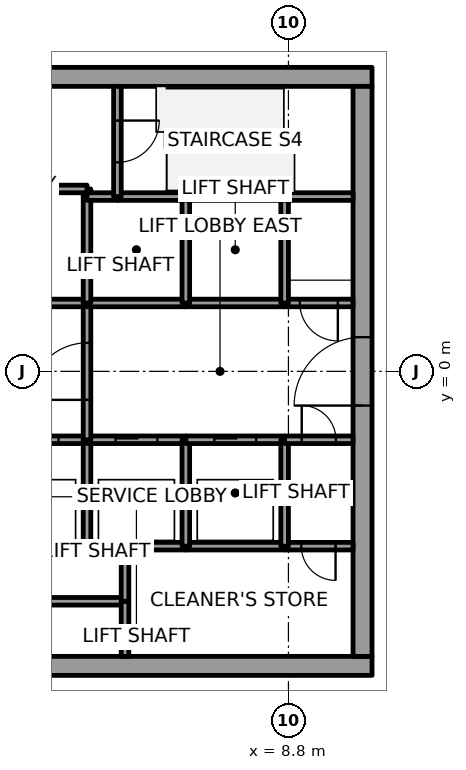
"""IFC4 building model, lengths in metres.
Left out: names, types, materials, properties, quantities, classifications, styles, units other than length and angle.
Written with IfcOpenShell. Run it as: python <this file> out.ifc"""

import sys

from ifc_helpers import new_model, si_unit, direction, frame, frame_2d, origin, place, context, subcontext, project, spatial, rectangle, extrude, element, fill, save


model = new_model("IFC4")
c1 = context("Model", 3, precision=1e-05, world=origin(), true_north=direction((0.0, 1.0)))
c2 = subcontext(c1, "Body", "Model", "MODEL_VIEW")
j1 = project(units=[si_unit("LENGTHUNIT", "METRE"), si_unit("PLANEANGLEUNIT", "RADIAN")], contexts=[c1])
p1 = place(None, origin())
s1 = spatial("IfcSite", under=j1, at=p1, CompositionType="ELEMENT")
p2 = place(p1, origin())
s2 = spatial("IfcBuilding", under=s1, at=p2, CompositionType="ELEMENT")
p3 = place(p2, frame((0.0, 0.0, 137.8)))
s3 = spatial("IfcBuildingStorey", under=s2, at=p3, CompositionType="ELEMENT", Elevation=137.8)
p4 = place(p3, frame((-11.0, -7.75, 0.0), z_axis=(0.0, 0.0, 1.0), x_axis=(1.0, 0.0, 0.0)))
e1 = element("IfcWall", 1, at=p4, inside=s3, PredefinedType="SHEAR", context=c2, shape_type="SweptSolid", body=[
    extrude(rectangle(XDim=22.0, YDim=0.5, at=frame_2d((11.0, 0.0))), origin(), (0.0, 0.0, 1.0), 4.0),
])
p5 = place(p4, frame((10.45, 0.0, 0.0)))
e2 = element("IfcOpeningElement", 2, at=p5, cuts=e1, PredefinedType="OPENING", context=c2, shape_type="SweptSolid", body=[
    extrude(rectangle(XDim=1.1, YDim=2.1, at=frame_2d((0.55, 1.05))), frame((0.0, 0.25, 0.0), z_axis=(0.0, -1.0, 0.0), x_axis=(1.0, 0.0, 0.0)), (0.0, 0.0, 1.0), 0.5),
])
p6 = place(p3, frame((-11.0, 7.75, 0.0), z_axis=(0.0, 0.0, 1.0), x_axis=(1.0, 0.0, 0.0)))
e3 = element("IfcWall", 3, at=p6, inside=s3, PredefinedType="SHEAR", context=c2, shape_type="SweptSolid", body=[
    extrude(rectangle(XDim=22.0, YDim=0.5, at=frame_2d((11.0, 0.0))), origin(), (0.0, 0.0, 1.0), 4.0),
])
p7 = place(p6, frame((10.45, 0.0, 0.0)))
e4 = element("IfcOpeningElement", 4, at=p7, cuts=e3, PredefinedType="OPENING", context=c2, shape_type="SweptSolid", body=[
    extrude(rectangle(XDim=1.1, YDim=2.1, at=frame_2d((0.55, 1.05))), frame((0.0, 0.25, 0.0), z_axis=(0.0, -1.0, 0.0), x_axis=(1.0, 0.0, 0.0)), (0.0, 0.0, 1.0), 0.5),
])
p8 = place(p3, frame((10.75, -7.5, 0.0), z_axis=(0.0, 0.0, 1.0), x_axis=(0.0, 1.0, 0.0)))
e5 = element("IfcWall", 5, at=p8, inside=s3, PredefinedType="SHEAR", context=c2, shape_type="SweptSolid", body=[
    extrude(rectangle(XDim=15.0, YDim=0.5, at=frame_2d((7.5, 0.0))), origin(), (0.0, 0.0, 1.0), 4.0),
])
p9 = place(p8, frame((6.6, 0.0, 0.0)))
e6 = element("IfcOpeningElement", 6, at=p9, cuts=e5, PredefinedType="OPENING", context=c2, shape_type="SweptSolid", body=[
    extrude(rectangle(XDim=1.8, YDim=2.1, at=frame_2d((0.9, 1.05))), frame((0.0, 0.25, 0.0), z_axis=(0.0, -1.0, 0.0), x_axis=(1.0, 0.0, 0.0)), (0.0, 0.0, 1.0), 0.5),
])
p10 = place(p3, frame((4.5, -6.05, 0.0), z_axis=(0.0, 0.0, 1.0), x_axis=(-1.0, 0.0, 0.0)))
e7 = element("IfcWall", 7, at=p10, inside=s3, PredefinedType="SOLIDWALL", context=c2, shape_type="SweptSolid", body=[
    extrude(rectangle(XDim=3.6, YDim=0.2, at=frame_2d((1.8, 0.0))), origin(), (0.0, 0.0, 1.0), 3.85),
])
p11 = place(p3, frame((3.5, -4.6, 0.0), z_axis=(0.0, 0.0, 1.0), x_axis=(-1.0, 0.0, 0.0)))
e8 = element("IfcWall", 8, at=p11, inside=s3, PredefinedType="SOLIDWALL", context=c2, shape_type="SweptSolid", body=[
    extrude(rectangle(XDim=2.6, YDim=0.2, at=frame_2d((1.3, 0.0))), origin(), (0.0, 0.0, 1.0), 3.85),
])
p12 = place(p3, frame((0.9, -1.8, 0.0), z_axis=(0.0, 0.0, 1.0), x_axis=(1.0, 0.0, 0.0)))
e9 = element("IfcWall", 9, at=p12, inside=s3, PredefinedType="SOLIDWALL", context=c2, shape_type="SweptSolid", body=[
    extrude(rectangle(XDim=2.6, YDim=0.2, at=frame_2d((1.3, 0.0))), origin(), (0.0, 0.0, 1.0), 3.85),
])
p13 = place(p12, frame((0.75, 0.0, 0.0)))
e10 = element("IfcOpeningElement", 10, at=p13, cuts=e9, PredefinedType="OPENING", context=c2, shape_type="SweptSolid", body=[
    extrude(rectangle(XDim=1.1, YDim=2.1, at=frame_2d((0.55, 1.05))), frame((0.0, 0.1, 0.0), z_axis=(0.0, -1.0, 0.0), x_axis=(1.0, 0.0, 0.0)), (0.0, 0.0, 1.0), 0.2),
])
p14 = place(p3, frame((3.5, 1.8, 0.0), z_axis=(0.0, 0.0, 1.0), x_axis=(-1.0, 0.0, 0.0)))
e11 = element("IfcWall", 11, at=p14, inside=s3, PredefinedType="SOLIDWALL", context=c2, shape_type="SweptSolid", body=[
    extrude(rectangle(XDim=2.6, YDim=0.2, at=frame_2d((1.3, 0.0))), origin(), (0.0, 0.0, 1.0), 3.85),
])
p15 = place(p3, frame((3.5, 4.6, 0.0), z_axis=(0.0, 0.0, 1.0), x_axis=(0.0, 1.0, 0.0)))
e12 = element("IfcWall", 12, at=p15, inside=s3, PredefinedType="SOLIDWALL", context=c2, shape_type="SweptSolid", body=[
    extrude(rectangle(XDim=0.2, YDim=0.2, at=frame_2d((0.1, 0.0))), origin(), (0.0, 0.0, 1.0), 3.85),
])
p16 = place(p3, frame((3.5, 4.8, 0.0), z_axis=(0.0, 0.0, 1.0), x_axis=(-1.0, 0.0, 0.0)))
e13 = element("IfcWall", 13, at=p16, inside=s3, PredefinedType="SOLIDWALL", context=c2, shape_type="SweptSolid", body=[
    extrude(rectangle(XDim=2.6, YDim=0.2, at=frame_2d((1.3, 0.0))), origin(), (0.0, 0.0, 1.0), 3.85),
])
p17 = place(p3, frame((4.5, -4.6, 0.0), z_axis=(0.0, 0.0, 1.0), x_axis=(-1.0, 0.0, 0.0)))
e14 = element("IfcWall", 14, at=p17, inside=s3, PredefinedType="SOLIDWALL", context=c2, shape_type="SweptSolid", body=[
    extrude(rectangle(XDim=1.0, YDim=0.2, at=frame_2d((0.5, 0.0))), origin(), (0.0, 0.0, 1.0), 3.85),
])
p18 = place(p3, frame((3.5, -4.6, 0.0), z_axis=(0.0, 0.0, 1.0), x_axis=(0.0, 1.0, 0.0)))
e15 = element("IfcWall", 15, at=p18, inside=s3, PredefinedType="SOLIDWALL", context=c2, shape_type="SweptSolid", body=[
    extrude(rectangle(XDim=2.8, YDim=0.2, at=frame_2d((1.4, 0.0))), origin(), (0.0, 0.0, 1.0), 3.85),
])
p19 = place(p3, frame((3.5, -1.8, 0.0), z_axis=(0.0, 0.0, 1.0), x_axis=(1.0, 0.0, 0.0)))
e16 = element("IfcWall", 16, at=p19, inside=s3, PredefinedType="SOLIDWALL", context=c2, shape_type="SweptSolid", body=[
    extrude(rectangle(XDim=2.6, YDim=0.2, at=frame_2d((1.3, 0.0))), origin(), (0.0, 0.0, 1.0), 3.85),
])
p20 = place(p19, frame((0.75, 0.0, 0.0)))
e17 = element("IfcOpeningElement", 17, at=p20, cuts=e16, PredefinedType="OPENING", context=c2, shape_type="SweptSolid", body=[
    extrude(rectangle(XDim=1.1, YDim=2.1, at=frame_2d((0.55, 1.05))), frame((0.0, 0.1, 0.0), z_axis=(0.0, -1.0, 0.0), x_axis=(1.0, 0.0, 0.0)), (0.0, 0.0, 1.0), 0.2),
])
p21 = place(p3, frame((3.5, -1.8, 0.0), z_axis=(0.0, 0.0, 1.0), x_axis=(0.0, 1.0, 0.0)))
e18 = element("IfcWall", 18, at=p21, inside=s3, PredefinedType="SOLIDWALL", context=c2, shape_type="SweptSolid", body=[
    extrude(rectangle(XDim=3.6, YDim=0.2, at=frame_2d((1.8, 0.0))), origin(), (0.0, 0.0, 1.0), 3.85),
])
p22 = place(p21, frame((1.05, 0.0, 0.0)))
e19 = element("IfcOpeningElement", 19, at=p22, cuts=e18, PredefinedType="OPENING", context=c2, shape_type="SweptSolid", body=[
    extrude(rectangle(XDim=1.5, YDim=2.1, at=frame_2d((0.75, 1.05))), frame((0.0, 0.1, 0.0), z_axis=(0.0, -1.0, 0.0), x_axis=(1.0, 0.0, 0.0)), (0.0, 0.0, 1.0), 0.2),
])
p23 = place(p3, frame((6.1, 1.8, 0.0), z_axis=(0.0, 0.0, 1.0), x_axis=(-1.0, 0.0, 0.0)))
e20 = element("IfcWall", 20, at=p23, inside=s3, PredefinedType="SOLIDWALL", context=c2, shape_type="SweptSolid", body=[
    extrude(rectangle(XDim=2.6, YDim=0.2, at=frame_2d((1.3, 0.0))), origin(), (0.0, 0.0, 1.0), 3.85),
])
p24 = place(p3, frame((3.5, 1.8, 0.0), z_axis=(0.0, 0.0, 1.0), x_axis=(0.0, 1.0, 0.0)))
e21 = element("IfcWall", 21, at=p24, inside=s3, PredefinedType="SOLIDWALL", context=c2, shape_type="SweptSolid", body=[
    extrude(rectangle(XDim=2.8, YDim=0.2, at=frame_2d((1.4, 0.0))), origin(), (0.0, 0.0, 1.0), 3.85),
])
p25 = place(p3, frame((4.3, 4.6, 0.0), z_axis=(0.0, 0.0, 1.0), x_axis=(-1.0, 0.0, 0.0)))
e22 = element("IfcWall", 22, at=p25, inside=s3, PredefinedType="SOLIDWALL", context=c2, shape_type="SweptSolid", body=[
    extrude(rectangle(XDim=0.8, YDim=0.2, at=frame_2d((0.4, 0.0))), origin(), (0.0, 0.0, 1.0), 3.85),
])
p26 = place(p3, frame((6.1, 4.6, 0.0), z_axis=(0.0, 0.0, 1.0), x_axis=(-1.0, 0.0, 0.0)))
e23 = element("IfcWall", 23, at=p26, inside=s3, PredefinedType="SOLIDWALL", context=c2, shape_type="SweptSolid", body=[
    extrude(rectangle(XDim=1.8, YDim=0.2, at=frame_2d((0.9, 0.0))), origin(), (0.0, 0.0, 1.0), 3.85),
])
p27 = place(p3, frame((4.3, 7.5, 0.0), z_axis=(0.0, 0.0, 1.0), x_axis=(0.0, -1.0, 0.0)))
e24 = element("IfcWall", 24, at=p27, inside=s3, PredefinedType="SOLIDWALL", context=c2, shape_type="SweptSolid", body=[
    extrude(rectangle(XDim=2.9, YDim=0.2, at=frame_2d((1.45, 0.0))), origin(), (0.0, 0.0, 1.0), 3.85),
])
p28 = place(p27, frame((0.9, 0.0, 0.0)))
e25 = element("IfcOpeningElement", 25, at=p28, cuts=e24, PredefinedType="OPENING", context=c2, shape_type="SweptSolid", body=[
    extrude(rectangle(XDim=1.1, YDim=2.1, at=frame_2d((0.55, 1.05))), frame((0.0, 0.1, 0.0), z_axis=(0.0, -1.0, 0.0), x_axis=(1.0, 0.0, 0.0)), (0.0, 0.0, 1.0), 0.2),
])
for number, where, z_axis, x_axis in (
    (26, (4.5, -6.05, 0.0), (0.0, 0.0, 1.0), (0.0, -1.0, 0.0)),
    (27, (4.5, -4.6, 0.0), (0.0, 0.0, 1.0), (0.0, -1.0, 0.0)),
):
    element("IfcWall", number, at=place(p3, frame(where, z_axis=z_axis, x_axis=x_axis)), inside=s3, PredefinedType="SOLIDWALL", context=c2, shape_type="SweptSolid", body=[
        extrude(rectangle(XDim=1.45, YDim=0.2, at=frame_2d((0.725, 0.0))), origin(), (0.0, 0.0, 1.0), 3.85),
    ])
p29 = place(p3, frame((6.1, -4.6, 0.0), z_axis=(0.0, 0.0, 1.0), x_axis=(-1.0, 0.0, 0.0)))
e28 = element("IfcWall", 28, at=p29, inside=s3, PredefinedType="SOLIDWALL", context=c2, shape_type="SweptSolid", body=[
    extrude(rectangle(XDim=1.6, YDim=0.2, at=frame_2d((0.8, 0.0))), origin(), (0.0, 0.0, 1.0), 3.85),
])
p30 = place(p3, frame((8.7, -4.6, 0.0), z_axis=(0.0, 0.0, 1.0), x_axis=(-1.0, 0.0, 0.0)))
e29 = element("IfcWall", 29, at=p30, inside=s3, PredefinedType="SOLIDWALL", context=c2, shape_type="SweptSolid", body=[
    extrude(rectangle(XDim=2.6, YDim=0.2, at=frame_2d((1.3, 0.0))), origin(), (0.0, 0.0, 1.0), 3.85),
])
p31 = place(p3, frame((6.1, -4.6, 0.0), z_axis=(0.0, 0.0, 1.0), x_axis=(0.0, 1.0, 0.0)))
e30 = element("IfcWall", 30, at=p31, inside=s3, PredefinedType="SOLIDWALL", context=c2, shape_type="SweptSolid", body=[
    extrude(rectangle(XDim=2.8, YDim=0.2, at=frame_2d((1.4, 0.0))), origin(), (0.0, 0.0, 1.0), 3.85),
])
p32 = place(p3, frame((6.1, -1.8, 0.0), z_axis=(0.0, 0.0, 1.0), x_axis=(1.0, 0.0, 0.0)))
e31 = element("IfcWall", 31, at=p32, inside=s3, PredefinedType="SOLIDWALL", context=c2, shape_type="SweptSolid", body=[
    extrude(rectangle(XDim=2.6, YDim=0.2, at=frame_2d((1.3, 0.0))), origin(), (0.0, 0.0, 1.0), 3.85),
])
p33 = place(p32, frame((0.75, 0.0, 0.0)))
e32 = element("IfcOpeningElement", 32, at=p33, cuts=e31, PredefinedType="OPENING", context=c2, shape_type="SweptSolid", body=[
    extrude(rectangle(XDim=1.1, YDim=2.1, at=frame_2d((0.55, 1.05))), frame((0.0, 0.1, 0.0), z_axis=(0.0, -1.0, 0.0), x_axis=(1.0, 0.0, 0.0)), (0.0, 0.0, 1.0), 0.2),
])
p34 = place(p3, frame((8.7, 1.8, 0.0), z_axis=(0.0, 0.0, 1.0), x_axis=(-1.0, 0.0, 0.0)))
e33 = element("IfcWall", 33, at=p34, inside=s3, PredefinedType="SOLIDWALL", context=c2, shape_type="SweptSolid", body=[
    extrude(rectangle(XDim=2.6, YDim=0.2, at=frame_2d((1.3, 0.0))), origin(), (0.0, 0.0, 1.0), 3.85),
])
p35 = place(p3, frame((6.1, 1.8, 0.0), z_axis=(0.0, 0.0, 1.0), x_axis=(0.0, 1.0, 0.0)))
e34 = element("IfcWall", 34, at=p35, inside=s3, PredefinedType="SOLIDWALL", context=c2, shape_type="SweptSolid", body=[
    extrude(rectangle(XDim=2.8, YDim=0.2, at=frame_2d((1.4, 0.0))), origin(), (0.0, 0.0, 1.0), 3.85),
])
p36 = place(p3, frame((8.7, 4.6, 0.0), z_axis=(0.0, 0.0, 1.0), x_axis=(-1.0, 0.0, 0.0)))
e35 = element("IfcWall", 35, at=p36, inside=s3, PredefinedType="SOLIDWALL", context=c2, shape_type="SweptSolid", body=[
    extrude(rectangle(XDim=2.6, YDim=0.2, at=frame_2d((1.3, 0.0))), origin(), (0.0, 0.0, 1.0), 3.85),
])
p37 = place(p3, frame((10.5, -4.6, 0.0), z_axis=(0.0, 0.0, 1.0), x_axis=(-1.0, 0.0, 0.0)))
e36 = element("IfcWall", 36, at=p37, inside=s3, PredefinedType="SOLIDWALL", context=c2, shape_type="SweptSolid", body=[
    extrude(rectangle(XDim=1.8, YDim=0.2, at=frame_2d((0.9, 0.0))), origin(), (0.0, 0.0, 1.0), 3.85),
])
p38 = place(p37, frame((0.46, 0.0, 0.0)))
e37 = element("IfcOpeningElement", 37, at=p38, cuts=e36, PredefinedType="OPENING", context=c2, shape_type="SweptSolid", body=[
    extrude(rectangle(XDim=0.9, YDim=2.1, at=frame_2d((0.45, 1.05))), frame((0.0, 0.1, 0.0), z_axis=(0.0, -1.0, 0.0), x_axis=(1.0, 0.0, 0.0)), (0.0, 0.0, 1.0), 0.2),
])
p39 = place(p3, frame((8.7, -1.8, 0.0), z_axis=(0.0, 0.0, 1.0), x_axis=(0.0, -1.0, 0.0)))
e38 = element("IfcWall", 38, at=p39, inside=s3, PredefinedType="SOLIDWALL", context=c2, shape_type="SweptSolid", body=[
    extrude(rectangle(XDim=2.8, YDim=0.2, at=frame_2d((1.4, 0.0))), origin(), (0.0, 0.0, 1.0), 3.85),
])
p40 = place(p3, frame((8.7, -1.8, 0.0), z_axis=(0.0, 0.0, 1.0), x_axis=(1.0, 0.0, 0.0)))
e39 = element("IfcWall", 39, at=p40, inside=s3, PredefinedType="SOLIDWALL", context=c2, shape_type="SweptSolid", body=[
    extrude(rectangle(XDim=1.8, YDim=0.2, at=frame_2d((0.9, 0.0))), origin(), (0.0, 0.0, 1.0), 3.85),
])
p41 = place(p40, frame((0.45, 0.0, 0.0)))
e40 = element("IfcOpeningElement", 40, at=p41, cuts=e39, PredefinedType="OPENING", context=c2, shape_type="SweptSolid", body=[
    extrude(rectangle(XDim=0.9, YDim=2.1, at=frame_2d((0.45, 1.05))), frame((0.0, 0.1, 0.0), z_axis=(0.0, -1.0, 0.0), x_axis=(1.0, 0.0, 0.0)), (0.0, 0.0, 1.0), 0.2),
])
p42 = place(p3, frame((10.5, 1.8, 0.0), z_axis=(0.0, 0.0, 1.0), x_axis=(-1.0, 0.0, 0.0)))
e41 = element("IfcWall", 41, at=p42, inside=s3, PredefinedType="SOLIDWALL", context=c2, shape_type="SweptSolid", body=[
    extrude(rectangle(XDim=1.8, YDim=0.2, at=frame_2d((0.9, 0.0))), origin(), (0.0, 0.0, 1.0), 3.85),
])
p43 = place(p42, frame((0.4, 0.0, 0.0)))
e42 = element("IfcOpeningElement", 42, at=p43, cuts=e41, PredefinedType="OPENING", context=c2, shape_type="SweptSolid", body=[
    extrude(rectangle(XDim=1.0, YDim=2.1, at=frame_2d((0.5, 1.05))), frame((0.0, 0.1, 0.0), z_axis=(0.0, -1.0, 0.0), x_axis=(1.0, 0.0, 0.0)), (0.0, 0.0, 1.0), 0.2),
])
p44 = place(p3, frame((8.7, 4.6, 0.0), z_axis=(0.0, 0.0, 1.0), x_axis=(0.0, -1.0, 0.0)))
e43 = element("IfcWall", 43, at=p44, inside=s3, PredefinedType="SOLIDWALL", context=c2, shape_type="SweptSolid", body=[
    extrude(rectangle(XDim=2.8, YDim=0.2, at=frame_2d((1.4, 0.0))), origin(), (0.0, 0.0, 1.0), 3.85),
])
p45 = place(p3, frame((10.5, 4.6, 0.0), z_axis=(0.0, 0.0, 1.0), x_axis=(-1.0, 0.0, 0.0)))
e44 = element("IfcWall", 44, at=p45, inside=s3, PredefinedType="SOLIDWALL", context=c2, shape_type="SweptSolid", body=[
    extrude(rectangle(XDim=1.8, YDim=0.2, at=frame_2d((0.9, 0.0))), origin(), (0.0, 0.0, 1.0), 3.85),
])
p46 = place(p13, origin())
e45 = element("IfcDoor", 45, at=p46, inside=s3, OperationType="SLIDING_TO_RIGHT", PredefinedType="DOOR", context=c2, shape_type="SweptSolid", body=[
    extrude(rectangle(XDim=1.1, YDim=2.1, at=frame_2d((0.55, 1.05))), frame((0.0, 0.025, 0.0), z_axis=(0.0, -1.0, 0.0), x_axis=(1.0, 0.0, 0.0)), (0.0, 0.0, 1.0), 0.05),
])
fill(e10, e45)
p47 = place(p20, origin())
e46 = element("IfcDoor", 46, at=p47, inside=s3, OperationType="SLIDING_TO_RIGHT", PredefinedType="DOOR", context=c2, shape_type="SweptSolid", body=[
    extrude(rectangle(XDim=1.1, YDim=2.1, at=frame_2d((0.55, 1.05))), frame((0.0, 0.025, 0.0), z_axis=(0.0, -1.0, 0.0), x_axis=(1.0, 0.0, 0.0)), (0.0, 0.0, 1.0), 0.05),
])
fill(e17, e46)
p48 = place(p33, origin())
e47 = element("IfcDoor", 47, at=p48, inside=s3, OperationType="SLIDING_TO_LEFT", PredefinedType="DOOR", context=c2, shape_type="SweptSolid", body=[
    extrude(rectangle(XDim=1.1, YDim=2.1, at=frame_2d((0.55, 1.05))), frame((0.0, 0.025, 0.0), z_axis=(0.0, -1.0, 0.0), x_axis=(1.0, 0.0, 0.0)), (0.0, 0.0, 1.0), 0.05),
])
fill(e32, e47)
p49 = place(p22, origin())
e48 = element("IfcDoor", 48, at=p49, inside=s3, OperationType="DOUBLE_DOOR_SINGLE_SWING", PredefinedType="DOOR", context=c2, shape_type="SweptSolid", body=[
    extrude(rectangle(XDim=1.5, YDim=2.1, at=frame_2d((0.75, 1.05))), frame((0.0, 0.025, 0.0), z_axis=(0.0, -1.0, 0.0), x_axis=(1.0, 0.0, 0.0)), (0.0, 0.0, 1.0), 0.05),
])
fill(e19, e48)
p50 = place(p43, origin())
e49 = element("IfcDoor", 49, at=p50, inside=s3, OperationType="SINGLE_SWING_LEFT", PredefinedType="DOOR", context=c2, shape_type="SweptSolid", body=[
    extrude(rectangle(XDim=1.0, YDim=2.1, at=frame_2d((0.5, 1.05))), frame((0.0, 0.025, 0.0), z_axis=(0.0, -1.0, 0.0), x_axis=(1.0, 0.0, 0.0)), (0.0, 0.0, 1.0), 0.05),
])
fill(e42, e49)
p51 = place(p28, origin())
e50 = element("IfcDoor", 50, at=p51, inside=s3, OperationType="SINGLE_SWING_RIGHT", PredefinedType="DOOR", context=c2, shape_type="SweptSolid", body=[
    extrude(rectangle(XDim=1.1, YDim=2.1, at=frame_2d((0.55, 1.05))), frame((0.0, 0.025, 0.0), z_axis=(0.0, -1.0, 0.0), x_axis=(1.0, 0.0, 0.0)), (0.0, 0.0, 1.0), 0.05),
])
fill(e25, e50)
p52 = place(p38, origin())
e51 = element("IfcDoor", 51, at=p52, inside=s3, OperationType="SINGLE_SWING_LEFT", PredefinedType="DOOR", context=c2, shape_type="SweptSolid", body=[
    extrude(rectangle(XDim=0.9, YDim=2.1, at=frame_2d((0.45, 1.05))), frame((0.0, 0.025, 0.0), z_axis=(0.0, -1.0, 0.0), x_axis=(1.0, 0.0, 0.0)), (0.0, 0.0, 1.0), 0.05),
])
fill(e37, e51)
p53 = place(p41, origin())
e52 = element("IfcDoor", 52, at=p53, inside=s3, OperationType="SINGLE_SWING_LEFT", PredefinedType="DOOR", context=c2, shape_type="SweptSolid", body=[
    extrude(rectangle(XDim=0.9, YDim=2.1, at=frame_2d((0.45, 1.05))), frame((0.0, 0.025, 0.0), z_axis=(0.0, -1.0, 0.0), x_axis=(1.0, 0.0, 0.0)), (0.0, 0.0, 1.0), 0.05),
])
fill(e40, e52)
p54 = place(p9, origin())
e53 = element("IfcDoor", 53, at=p54, inside=s3, OperationType="DOUBLE_DOOR_SINGLE_SWING", PredefinedType="DOOR", context=c2, shape_type="SweptSolid", body=[
    extrude(rectangle(XDim=1.8, YDim=2.1, at=frame_2d((0.9, 1.05))), frame((0.0, 0.025, 0.0), z_axis=(0.0, -1.0, 0.0), x_axis=(1.0, 0.0, 0.0)), (0.0, 0.0, 1.0), 0.05),
])
fill(e6, e53)
save(model, sys.argv[1])
